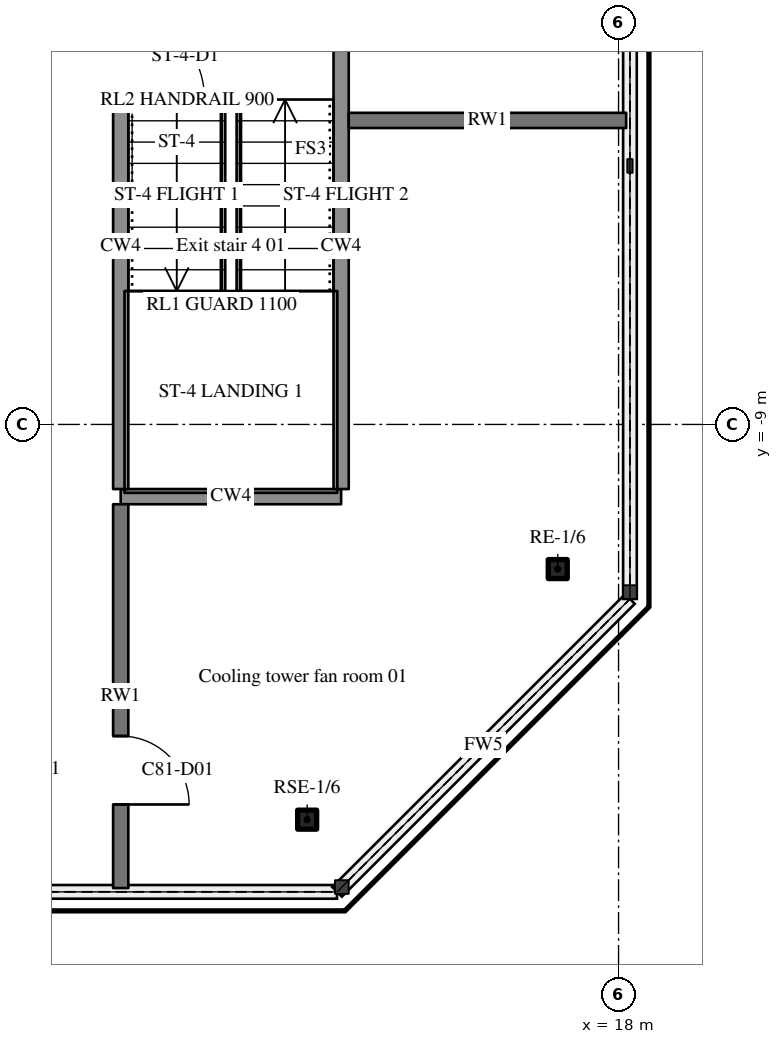
"""IFC4 building model, lengths in metres.
Left out: names, types, materials, properties, quantities, classifications, styles, units other than length and angle.
Written with IfcOpenShell. Run it as: python <this file> out.ifc"""

import sys

from ifc_helpers import new_model, si_unit, direction, frame, frame_2d, origin, origin_2d, place, context, subcontext, project, spatial, rectangle, hollow_rectangle, extrude, element, fill, save


model = new_model("IFC4")
c1 = context("Model", 3, precision=1e-05, world=origin(), true_north=direction((0.0, 1.0)))
c2 = subcontext(c1, "Body", "Model", "MODEL_VIEW")
j1 = project(units=[si_unit("LENGTHUNIT", "METRE"), si_unit("PLANEANGLEUNIT", "RADIAN")], contexts=[c1])
p1 = place(None, origin())
s1 = spatial("IfcSite", under=j1, at=p1, CompositionType="ELEMENT")
p2 = place(p1, origin())
s2 = spatial("IfcBuilding", under=s1, at=p2, CompositionType="ELEMENT")
p3 = place(p2, frame((0.0, 0.0, 300.9)))
s3 = spatial("IfcBuildingStorey", under=s2, at=p3, CompositionType="ELEMENT", Elevation=300.9)
for number, where, z_axis, x_axis in (
    (1, (13.903, -14.2, 0.0), (0.0, 0.0, 1.0), (1.0, 0.0, 0.0)),
    (2, (17.2, -10.903, 0.0), (0.0, 0.0, 1.0), (1.0, 0.0, 0.0)),
):
    element("IfcColumn", number, at=place(p3, frame(where, z_axis=z_axis, x_axis=x_axis)), inside=s3, PredefinedType="COLUMN", context=c2, shape_type="SweptSolid", body=[
        extrude(hollow_rectangle(XDim=0.25, YDim=0.25, WallThickness=0.02, InnerFilletRadius=0.03, OuterFilletRadius=0.05, at=origin_2d()), origin(), (0.0, 0.0, 1.0), 3.6),
    ])
p4 = place(p3, frame((11.45, -9.95, 0.0), z_axis=(0.0, 0.0, 1.0), x_axis=(1.0, 0.0, 0.0)))
e3 = element("IfcWall", 3, at=p4, inside=s3, PredefinedType="SHEAR", context=c2, shape_type="SweptSolid", body=[
    extrude(rectangle(XDim=2.9, YDim=0.2, at=frame_2d((1.45, 0.0))), origin(), (0.0, 0.0, 1.0), 3.6),
])
p5 = place(p3, frame((14.45, -5.0, 0.0), z_axis=(0.0, 0.0, 1.0), x_axis=(1.0, 0.0, 0.0)))
e4 = element("IfcWall", 4, at=p5, inside=s3, PredefinedType="SOLIDWALL", context=c2, shape_type="SweptSolid", body=[
    extrude(rectangle(XDim=3.65, YDim=0.2, at=frame_2d((1.825, 0.0))), origin(), (0.0, 0.0, 1.0), 2.66),
])
p6 = place(p3, frame((11.45, -10.05, 0.0), z_axis=(0.0, 0.0, 1.0), x_axis=(0.0, -1.0, 0.0)))
e5 = element("IfcWall", 5, at=p6, inside=s3, PredefinedType="SOLIDWALL", context=c2, shape_type="SweptSolid", body=[
    extrude(rectangle(XDim=5.05, YDim=0.2, at=frame_2d((2.525, 0.0))), origin(), (0.0, 0.0, 1.0), 2.66),
])
p7 = place(p6, frame((3.05, 0.0, 0.0)))
e6 = element("IfcOpeningElement", 6, at=p7, cuts=e5, PredefinedType="OPENING", context=c2, shape_type="SweptSolid", body=[
    extrude(rectangle(XDim=0.9, YDim=2.1, at=frame_2d((0.45, 1.05))), frame((0.0, 0.11, 0.0), z_axis=(0.0, -1.0, 0.0), x_axis=(1.0, 0.0, 0.0)), (0.0, 0.0, 1.0), 0.22),
])
p8 = place(p3, frame((11.45, -3.45, 0.0), z_axis=(0.0, 0.0, 1.0), x_axis=(0.0, -1.0, 0.0)))
e7 = element("IfcWall", 7, at=p8, inside=s3, PredefinedType="SHEAR", context=c2, shape_type="SweptSolid", body=[
    extrude(rectangle(XDim=6.4, YDim=0.2, at=frame_2d((3.2, 0.0))), origin(), (0.0, 0.0, 1.0), 3.6),
])
p9 = place(p8, frame((0.15, 0.0, 0.0)))
e8 = element("IfcOpeningElement", 8, at=p9, cuts=e7, PredefinedType="OPENING", context=c2, shape_type="SweptSolid", body=[
    extrude(rectangle(XDim=1.1, YDim=2.1, at=frame_2d((0.55, 1.05))), frame((0.0, 0.11, 0.0), z_axis=(0.0, -1.0, 0.0), x_axis=(1.0, 0.0, 0.0)), (0.0, 0.0, 1.0), 0.22),
])
p10 = place(p3, frame((14.35, -9.85, 0.0), z_axis=(0.0, 0.0, 1.0), x_axis=(0.0, 1.0, 0.0)))
e9 = element("IfcWall", 9, at=p10, inside=s3, PredefinedType="SHEAR", context=c2, shape_type="SweptSolid", body=[
    extrude(rectangle(XDim=6.4, YDim=0.2, at=frame_2d((3.2, 0.0))), origin(), (0.0, 0.0, 1.0), 3.6),
])
p11 = place(p9, origin())
e10 = element("IfcDoor", 10, at=p11, inside=s3, OperationType="SINGLE_SWING_RIGHT", PredefinedType="DOOR", context=c2, shape_type="SweptSolid", body=[
    extrude(rectangle(XDim=1.1, YDim=2.1, at=frame_2d((0.55, 1.05))), frame((0.0, 0.025, 0.0), z_axis=(0.0, -1.0, 0.0), x_axis=(1.0, 0.0, 0.0)), (0.0, 0.0, 1.0), 0.05),
])
fill(e8, e10)
p12 = place(p7, origin())
e11 = element("IfcDoor", 11, at=p12, inside=s3, OperationType="SINGLE_SWING_RIGHT", PredefinedType="DOOR", context=c2, shape_type="SweptSolid", body=[
    extrude(rectangle(XDim=0.9, YDim=2.1, at=frame_2d((0.45, 1.05))), frame((0.0, 0.025, 0.0), z_axis=(0.0, -1.0, 0.0), x_axis=(1.0, 0.0, 0.0)), (0.0, 0.0, 1.0), 0.05),
])
fill(e6, e11)
save(model, sys.argv[1])
